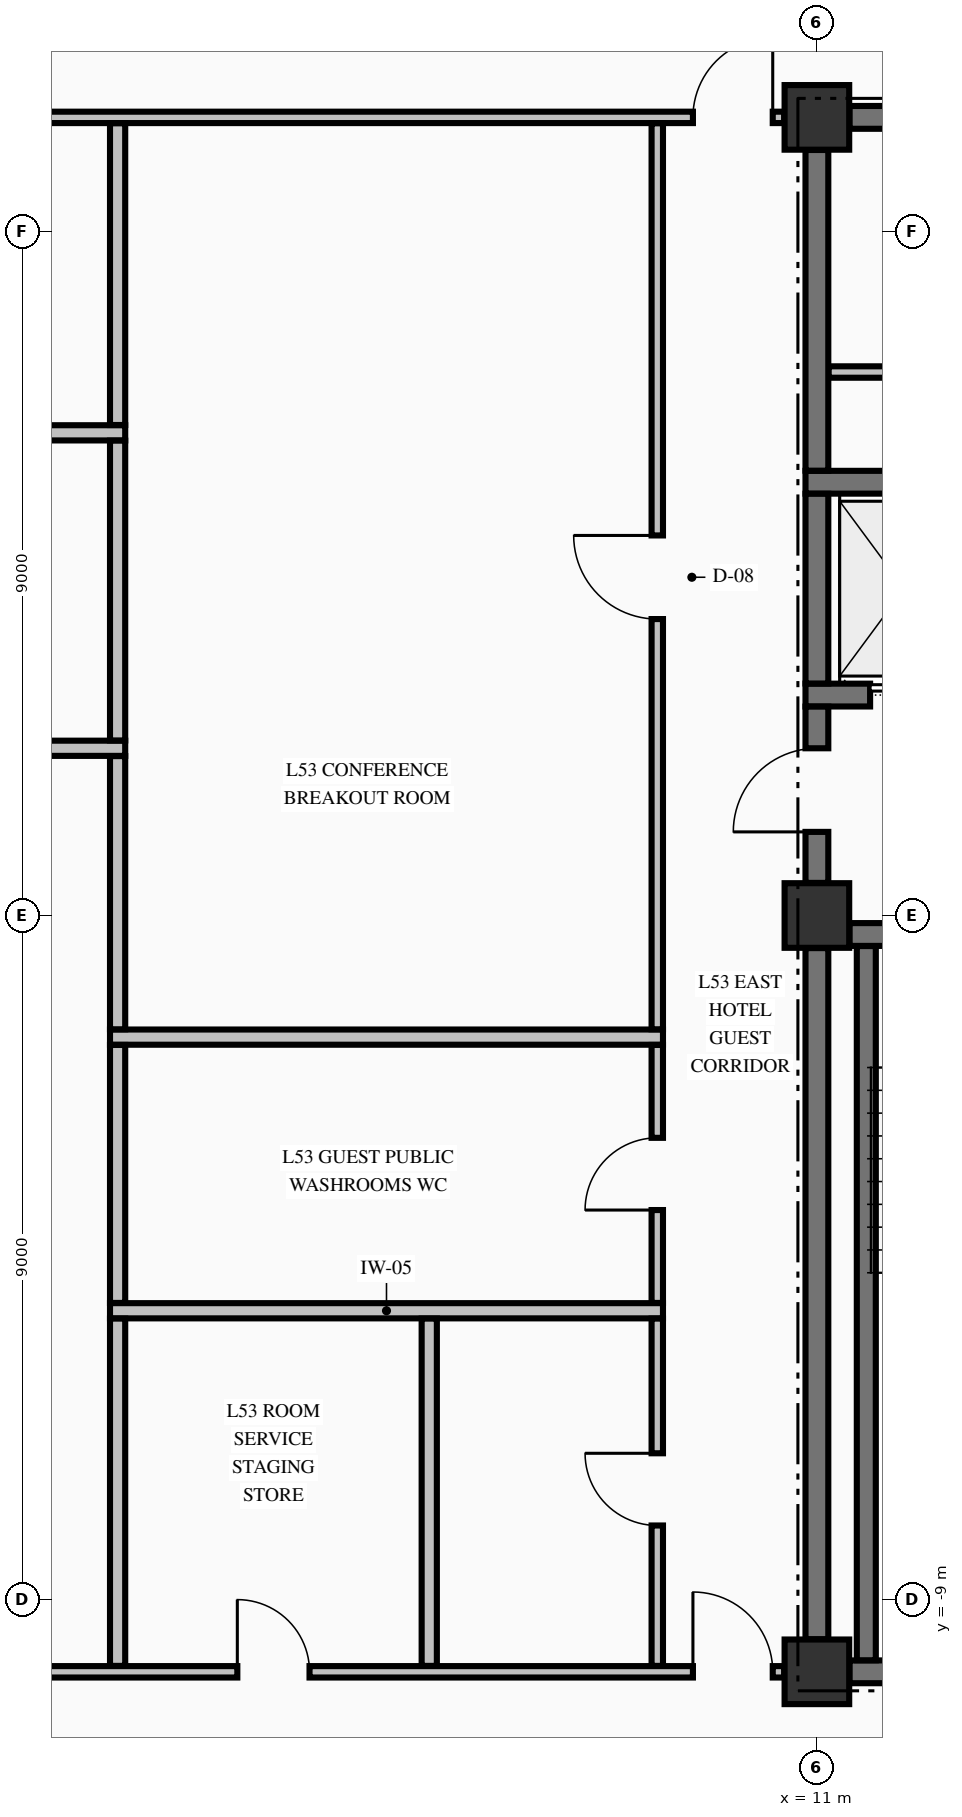
"""IFC4 building model, lengths in metres.
Left out: names, types, materials, properties, quantities, classifications, styles, units other than length and angle.
Written with IfcOpenShell. Run it as: python <this file> out.ifc"""

import sys

from ifc_helpers import new_model, si_unit, direction, frame, frame_2d, origin, origin_2d, place, context, subcontext, project, spatial, rectangle, extrude, element, fill, save


model = new_model("IFC4")
c1 = context("Model", 3, precision=1e-05, world=origin(), true_north=direction((0.0, 1.0)))
c2 = subcontext(c1, "Body", "Model", "MODEL_VIEW")
j1 = project(units=[si_unit("LENGTHUNIT", "METRE"), si_unit("PLANEANGLEUNIT", "RADIAN")], contexts=[c1])
p1 = place(None, origin())
s1 = spatial("IfcSite", under=j1, at=p1, CompositionType="ELEMENT")
p2 = place(p1, origin())
s2 = spatial("IfcBuilding", under=s1, at=p2, CompositionType="ELEMENT")
p3 = place(p2, frame((0.0, 0.0, 205.06)))
s3 = spatial("IfcBuildingStorey", under=s2, at=p3, CompositionType="ELEMENT", Elevation=205.06)
for number, where, z_axis, x_axis in (
    (1, (11.0, -9.95, -0.25), (0.0, 0.0, 1.0), (1.0, 0.0, 0.0)),
    (2, (11.0, 0.0, -0.25), (0.0, 0.0, 1.0), (1.0, 0.0, 0.0)),
    (3, (11.0, 10.5, -0.25), (0.0, 0.0, 1.0), (1.0, 0.0, 0.0)),
):
    element("IfcColumn", number, at=place(p3, frame(where, z_axis=z_axis, x_axis=x_axis)), inside=s3, PredefinedType="COLUMN", context=c2, shape_type="SweptSolid", body=[
        extrude(rectangle(XDim=0.85, YDim=0.85, at=origin_2d()), origin(), (0.0, 0.0, 1.0), 3.4),
    ])
p4 = place(p3, frame((11.429, -9.95, 0.0), z_axis=(0.0, 0.0, 1.0), x_axis=(1.0, 0.0, 0.0)))
e4 = element("IfcWall", 4, at=p4, inside=s3, PredefinedType="SHEAR", context=c2, shape_type="SweptSolid", body=[
    extrude(rectangle(XDim=3.271, YDim=0.3, at=frame_2d((1.635, 0.0))), origin(), (0.0, 0.0, 1.0), 3.15),
])
p5 = place(p3, frame((11.429, -0.25, 0.0), z_axis=(0.0, 0.0, 1.0), x_axis=(1.0, 0.0, 0.0)))
e5 = element("IfcWall", 5, at=p5, inside=s3, PredefinedType="SHEAR", context=c2, shape_type="SweptSolid", body=[
    extrude(rectangle(XDim=3.446, YDim=0.3, at=frame_2d((1.723, 0.0))), origin(), (0.0, 0.0, 1.0), 3.15),
])
p6 = place(p5, frame((1.171, 0.0, 0.0)))
e6 = element("IfcOpeningElement", 6, at=p6, cuts=e5, PredefinedType="OPENING", context=c2, shape_type="SweptSolid", body=[
    extrude(rectangle(XDim=1.1, YDim=2.15, at=frame_2d((0.55, 1.075))), frame((0.0, 0.16, 0.0), z_axis=(0.0, -1.0, 0.0), x_axis=(1.0, 0.0, 0.0)), (0.0, 0.0, 1.0), 0.32),
])
p7 = place(p3, frame((10.85, 2.9, 0.0), z_axis=(0.0, 0.0, 1.0), x_axis=(1.0, 0.0, 0.0)))
e7 = element("IfcWall", 7, at=p7, inside=s3, PredefinedType="SHEAR", context=c2, shape_type="SweptSolid", body=[
    extrude(rectangle(XDim=4.025, YDim=0.3, at=frame_2d((2.012, 0.0))), origin(), (0.0, 0.0, 1.0), 3.15),
])
p8 = place(p7, frame((0.85, 0.0, 0.0)))
e8 = element("IfcOpeningElement", 8, at=p8, cuts=e7, PredefinedType="OPENING", context=c2, shape_type="SweptSolid", body=[
    extrude(rectangle(XDim=1.1, YDim=2.2, at=frame_2d((0.55, 1.1))), frame((0.0, 0.16, 0.0), z_axis=(0.0, -1.0, 0.0), x_axis=(1.0, 0.0, 0.0)), (0.0, 0.0, 1.0), 0.32),
])
p9 = place(p3, frame((10.85, 5.7, 0.0), z_axis=(0.0, 0.0, 1.0), x_axis=(1.0, 0.0, 0.0)))
e9 = element("IfcWall", 9, at=p9, inside=s3, PredefinedType="SHEAR", context=c2, shape_type="SweptSolid", body=[
    extrude(rectangle(XDim=4.025, YDim=0.3, at=frame_2d((2.012, 0.0))), origin(), (0.0, 0.0, 1.0), 3.15),
])
p10 = place(p3, frame((11.429, 10.5, 0.0), z_axis=(0.0, 0.0, 1.0), x_axis=(1.0, 0.0, 0.0)))
e10 = element("IfcWall", 10, at=p10, inside=s3, PredefinedType="SHEAR", context=c2, shape_type="SweptSolid", body=[
    extrude(rectangle(XDim=3.271, YDim=0.3, at=frame_2d((1.635, 0.0))), origin(), (0.0, 0.0, 1.0), 3.15),
])
p11 = place(p10, frame((2.016, 0.0, 0.0)))
e11 = element("IfcOpeningElement", 11, at=p11, cuts=e10, PredefinedType="OPENING", context=c2, shape_type="SweptSolid", body=[
    extrude(rectangle(XDim=0.95, YDim=2.15, at=frame_2d((0.475, 1.075))), frame((0.0, 0.16, 0.0), z_axis=(0.0, -1.0, 0.0), x_axis=(1.0, 0.0, 0.0)), (0.0, 0.0, 1.0), 0.32),
])
p12 = place(p3, frame((-10.569, -9.95, 0.0), z_axis=(0.0, 0.0, 1.0), x_axis=(1.0, 0.0, 0.0)))
e12 = element("IfcWall", 12, at=p12, inside=s3, PredefinedType="PARTITIONING", context=c2, shape_type="SweptSolid", body=[
    extrude(rectangle(XDim=21.138, YDim=0.15, at=frame_2d((10.569, 0.0))), origin(), (0.0, 0.0, 1.0), 3.15),
])
p13 = place(p12, frame((0.15, 0.0, 0.0)))
e13 = element("IfcOpeningElement", 13, at=p13, cuts=e12, PredefinedType="OPENING", context=c2, shape_type="SweptSolid", body=[
    extrude(rectangle(XDim=1.05, YDim=2.15, at=frame_2d((0.525, 1.075))), frame((0.0, 0.085, 0.0), z_axis=(0.0, -1.0, 0.0), x_axis=(1.0, 0.0, 0.0)), (0.0, 0.0, 1.0), 0.17),
])
p14 = place(p12, frame((19.938, 0.0, 0.0)))
e14 = element("IfcOpeningElement", 14, at=p14, cuts=e12, PredefinedType="OPENING", context=c2, shape_type="SweptSolid", body=[
    extrude(rectangle(XDim=1.05, YDim=2.15, at=frame_2d((0.525, 1.075))), frame((0.0, 0.085, 0.0), z_axis=(0.0, -1.0, 0.0), x_axis=(1.0, 0.0, 0.0)), (0.0, 0.0, 1.0), 0.17),
])
p15 = place(p12, frame((13.944, 0.0, 0.0)))
e15 = element("IfcOpeningElement", 15, at=p15, cuts=e12, PredefinedType="OPENING", context=c2, shape_type="SweptSolid", body=[
    extrude(rectangle(XDim=0.95, YDim=2.15, at=frame_2d((0.475, 1.075))), frame((0.0, 0.085, 0.0), z_axis=(0.0, -1.0, 0.0), x_axis=(1.0, 0.0, 0.0)), (0.0, 0.0, 1.0), 0.17),
])
for number, where, z_axis, x_axis in (
    (16, (1.7, -5.2, 0.0), (0.0, 0.0, 1.0), (1.0, 0.0, 0.0)),
    (17, (1.7, -1.6, 0.0), (0.0, 0.0, 1.0), (1.0, 0.0, 0.0)),
):
    element("IfcWall", number, at=place(p3, frame(where, z_axis=z_axis, x_axis=x_axis)), inside=s3, PredefinedType="PARTITIONING", context=c2, shape_type="SweptSolid", body=[
        extrude(rectangle(XDim=7.275, YDim=0.2, at=frame_2d((3.638, 0.0))), origin(), (0.0, 0.0, 1.0), 3.15),
    ])
for number, where, z_axis, x_axis in (
    (18, (-8.975, 2.2, 0.0), (0.0, 0.0, 1.0), (1.0, 0.0, 0.0)),
    (19, (-8.975, 6.35, 0.0), (0.0, 0.0, 1.0), (1.0, 0.0, 0.0)),
):
    element("IfcWall", number, at=place(p3, frame(where, z_axis=z_axis, x_axis=x_axis)), inside=s3, PredefinedType="PARTITIONING", context=c2, shape_type="SweptSolid", body=[
        extrude(rectangle(XDim=10.875, YDim=0.2, at=frame_2d((5.438, 0.0))), origin(), (0.0, 0.0, 1.0), 3.15),
    ])
p16 = place(p3, frame((11.153, 7.15, 0.0), z_axis=(0.0, 0.0, 1.0), x_axis=(1.0, 0.0, 0.0)))
e20 = element("IfcWall", 20, at=p16, inside=s3, PredefinedType="PARTITIONING", context=c2, shape_type="SweptSolid", body=[
    extrude(rectangle(XDim=2.072, YDim=0.15, at=frame_2d((1.036, 0.0))), origin(), (0.0, 0.0, 1.0), 3.15),
])
p17 = place(p3, frame((-10.569, 10.5, 0.0), z_axis=(0.0, 0.0, 1.0), x_axis=(1.0, 0.0, 0.0)))
e21 = element("IfcWall", 21, at=p17, inside=s3, PredefinedType="PARTITIONING", context=c2, shape_type="SweptSolid", body=[
    extrude(rectangle(XDim=21.138, YDim=0.15, at=frame_2d((10.569, 0.0))), origin(), (0.0, 0.0, 1.0), 3.15),
])
p18 = place(p17, frame((0.15, 0.0, 0.0)))
e22 = element("IfcOpeningElement", 22, at=p18, cuts=e21, PredefinedType="OPENING", context=c2, shape_type="SweptSolid", body=[
    extrude(rectangle(XDim=1.05, YDim=2.15, at=frame_2d((0.525, 1.075))), frame((0.0, 0.085, 0.0), z_axis=(0.0, -1.0, 0.0), x_axis=(1.0, 0.0, 0.0)), (0.0, 0.0, 1.0), 0.17),
])
p19 = place(p17, frame((19.938, 0.0, 0.0)))
e23 = element("IfcOpeningElement", 23, at=p19, cuts=e21, PredefinedType="OPENING", context=c2, shape_type="SweptSolid", body=[
    extrude(rectangle(XDim=1.05, YDim=2.15, at=frame_2d((0.525, 1.075))), frame((0.0, 0.085, 0.0), z_axis=(0.0, -1.0, 0.0), x_axis=(1.0, 0.0, 0.0)), (0.0, 0.0, 1.0), 0.17),
])
p20 = place(p3, frame((11.0, -9.521, 0.0), z_axis=(0.0, 0.0, 1.0), x_axis=(0.0, 1.0, 0.0)))
e24 = element("IfcWall", 24, at=p20, inside=s3, PredefinedType="SHEAR", context=c2, shape_type="SweptSolid", body=[
    extrude(rectangle(XDim=9.092, YDim=0.3, at=frame_2d((4.546, 0.0))), origin(), (0.0, 0.0, 1.0), 3.15),
])
p21 = place(p3, frame((11.0, 0.429, 0.0), z_axis=(0.0, 0.0, 1.0), x_axis=(0.0, 1.0, 0.0)))
e25 = element("IfcWall", 25, at=p21, inside=s3, PredefinedType="SHEAR", context=c2, shape_type="SweptSolid", body=[
    extrude(rectangle(XDim=2.319, YDim=0.3, at=frame_2d((1.16, 0.0))), origin(), (0.0, 0.0, 1.0), 3.15),
])
p22 = place(p21, frame((0.671, 0.0, 0.0)))
e26 = element("IfcOpeningElement", 26, at=p22, cuts=e25, PredefinedType="OPENING", context=c2, shape_type="SweptSolid", body=[
    extrude(rectangle(XDim=1.1, YDim=2.15, at=frame_2d((0.55, 1.075))), frame((0.0, 0.16, 0.0), z_axis=(0.0, -1.0, 0.0), x_axis=(1.0, 0.0, 0.0)), (0.0, 0.0, 1.0), 0.32),
])
p23 = place(p3, frame((11.0, 3.052, 0.0), z_axis=(0.0, 0.0, 1.0), x_axis=(0.0, 1.0, 0.0)))
e27 = element("IfcWall", 27, at=p23, inside=s3, PredefinedType="SHEAR", context=c2, shape_type="SweptSolid", body=[
    extrude(rectangle(XDim=2.496, YDim=0.3, at=frame_2d((1.248, 0.0))), origin(), (0.0, 0.0, 1.0), 3.15),
])
p24 = place(p3, frame((11.0, 5.852, 0.0), z_axis=(0.0, 0.0, 1.0), x_axis=(0.0, 1.0, 0.0)))
e28 = element("IfcWall", 28, at=p24, inside=s3, PredefinedType="SHEAR", context=c2, shape_type="SweptSolid", body=[
    extrude(rectangle(XDim=4.219, YDim=0.3, at=frame_2d((2.109, 0.0))), origin(), (0.0, 0.0, 1.0), 3.15),
])
p25 = place(p3, frame((11.65, -9.798, 0.0), z_axis=(0.0, 0.0, 1.0), x_axis=(0.0, 1.0, 0.0)))
e29 = element("IfcWall", 29, at=p25, inside=s3, PredefinedType="SOLIDWALL", context=c2, shape_type="SweptSolid", body=[
    extrude(rectangle(XDim=9.396, YDim=0.25, at=frame_2d((4.698, 0.0))), origin(), (0.0, 0.0, 1.0), 3.15),
])
p26 = place(p3, frame((1.8, -9.872, 0.0), z_axis=(0.0, 0.0, 1.0), x_axis=(0.0, 1.0, 0.0)))
e30 = element("IfcWall", 30, at=p26, inside=s3, PredefinedType="PARTITIONING", context=c2, shape_type="SweptSolid", body=[
    extrude(rectangle(XDim=4.569, YDim=0.2, at=frame_2d((2.285, 0.0))), origin(), (0.0, 0.0, 1.0), 3.15),
])
p27 = place(p3, frame((1.8, -5.097, 0.0), z_axis=(0.0, 0.0, 1.0), x_axis=(0.0, 1.0, 0.0)))
e31 = element("IfcWall", 31, at=p27, inside=s3, PredefinedType="PARTITIONING", context=c2, shape_type="SweptSolid", body=[
    extrude(rectangle(XDim=3.394, YDim=0.2, at=frame_2d((1.697, 0.0))), origin(), (0.0, 0.0, 1.0), 3.15),
])
p28 = place(p3, frame((1.8, -1.497, 0.0), z_axis=(0.0, 0.0, 1.0), x_axis=(0.0, 1.0, 0.0)))
e32 = element("IfcWall", 32, at=p28, inside=s3, PredefinedType="PARTITIONING", context=c2, shape_type="SweptSolid", body=[
    extrude(rectangle(XDim=3.594, YDim=0.2, at=frame_2d((1.797, 0.0))), origin(), (0.0, 0.0, 1.0), 3.15),
])
p29 = place(p3, frame((1.8, 2.303, 0.0), z_axis=(0.0, 0.0, 1.0), x_axis=(0.0, 1.0, 0.0)))
e33 = element("IfcWall", 33, at=p29, inside=s3, PredefinedType="PARTITIONING", context=c2, shape_type="SweptSolid", body=[
    extrude(rectangle(XDim=3.944, YDim=0.2, at=frame_2d((1.972, 0.0))), origin(), (0.0, 0.0, 1.0), 3.15),
])
p30 = place(p3, frame((1.8, 6.453, 0.0), z_axis=(0.0, 0.0, 1.0), x_axis=(0.0, 1.0, 0.0)))
e34 = element("IfcWall", 34, at=p30, inside=s3, PredefinedType="PARTITIONING", context=c2, shape_type="SweptSolid", body=[
    extrude(rectangle(XDim=3.969, YDim=0.2, at=frame_2d((1.985, 0.0))), origin(), (0.0, 0.0, 1.0), 3.15),
])
p31 = place(p3, frame((5.9, -9.872, 0.0), z_axis=(0.0, 0.0, 1.0), x_axis=(0.0, 1.0, 0.0)))
e35 = element("IfcWall", 35, at=p31, inside=s3, PredefinedType="PARTITIONING", context=c2, shape_type="SweptSolid", body=[
    extrude(rectangle(XDim=4.569, YDim=0.2, at=frame_2d((2.285, 0.0))), origin(), (0.0, 0.0, 1.0), 3.15),
])
p32 = place(p3, frame((8.9, -9.872, 0.0), z_axis=(0.0, 0.0, 1.0), x_axis=(0.0, 1.0, 0.0)))
e36 = element("IfcWall", 36, at=p32, inside=s3, PredefinedType="PARTITIONING", context=c2, shape_type="SweptSolid", body=[
    extrude(rectangle(XDim=4.569, YDim=0.15, at=frame_2d((2.285, 0.0))), origin(), (0.0, 0.0, 1.0), 3.15),
])
p33 = place(p32, frame((1.847, 0.0, 0.0)))
e37 = element("IfcOpeningElement", 37, at=p33, cuts=e36, PredefinedType="OPENING", context=c2, shape_type="SweptSolid", body=[
    extrude(rectangle(XDim=0.95, YDim=2.15, at=frame_2d((0.475, 1.075))), frame((0.0, 0.085, 0.0), z_axis=(0.0, -1.0, 0.0), x_axis=(1.0, 0.0, 0.0)), (0.0, 0.0, 1.0), 0.17),
])
p34 = place(p3, frame((8.9, -5.097, 0.0), z_axis=(0.0, 0.0, 1.0), x_axis=(0.0, 1.0, 0.0)))
e38 = element("IfcWall", 38, at=p34, inside=s3, PredefinedType="PARTITIONING", context=c2, shape_type="SweptSolid", body=[
    extrude(rectangle(XDim=3.394, YDim=0.15, at=frame_2d((1.697, 0.0))), origin(), (0.0, 0.0, 1.0), 3.15),
])
p35 = place(p34, frame((1.222, 0.0, 0.0)))
e39 = element("IfcOpeningElement", 39, at=p35, cuts=e38, PredefinedType="OPENING", context=c2, shape_type="SweptSolid", body=[
    extrude(rectangle(XDim=0.95, YDim=2.15, at=frame_2d((0.475, 1.075))), frame((0.0, 0.085, 0.0), z_axis=(0.0, -1.0, 0.0), x_axis=(1.0, 0.0, 0.0)), (0.0, 0.0, 1.0), 0.17),
])
p36 = place(p3, frame((8.9, -1.497, 0.0), z_axis=(0.0, 0.0, 1.0), x_axis=(0.0, 1.0, 0.0)))
e40 = element("IfcWall", 40, at=p36, inside=s3, PredefinedType="PARTITIONING", context=c2, shape_type="SweptSolid", body=[
    extrude(rectangle(XDim=11.919, YDim=0.15, at=frame_2d((5.959, 0.0))), origin(), (0.0, 0.0, 1.0), 3.15),
])
p37 = place(p36, frame((5.397, 0.0, 0.0)))
e41 = element("IfcOpeningElement", 41, at=p37, cuts=e40, PredefinedType="OPENING", context=c2, shape_type="SweptSolid", body=[
    extrude(rectangle(XDim=1.1, YDim=2.15, at=frame_2d((0.55, 1.075))), frame((0.0, 0.085, 0.0), z_axis=(0.0, -1.0, 0.0), x_axis=(1.0, 0.0, 0.0)), (0.0, 0.0, 1.0), 0.17),
])
p38 = place(p22, origin())
e42 = element("IfcDoor", 42, at=p38, inside=s3, OperationType="SINGLE_SWING_LEFT", PredefinedType="DOOR", context=c2, shape_type="SweptSolid", body=[
    extrude(rectangle(XDim=1.1, YDim=2.15, at=frame_2d((0.55, 1.075))), frame((0.0, 0.025, 0.0), z_axis=(0.0, -1.0, 0.0), x_axis=(1.0, 0.0, 0.0)), (0.0, 0.0, 1.0), 0.05),
])
fill(e26, e42)
p39 = place(p8, origin())
e43 = element("IfcDoor", 43, at=p39, inside=s3, OperationType="SLIDING_TO_RIGHT", PredefinedType="DOOR", context=c2, shape_type="SweptSolid", body=[
    extrude(rectangle(XDim=1.1, YDim=2.2, at=frame_2d((0.55, 1.1))), frame((0.0, 0.025, 0.0), z_axis=(0.0, -1.0, 0.0), x_axis=(1.0, 0.0, 0.0)), (0.0, 0.0, 1.0), 0.05),
])
fill(e8, e43)
p40 = place(p19, origin())
e44 = element("IfcDoor", 44, at=p40, inside=s3, OperationType="SINGLE_SWING_RIGHT", PredefinedType="DOOR", context=c2, shape_type="SweptSolid", body=[
    extrude(rectangle(XDim=1.05, YDim=2.15, at=frame_2d((0.525, 1.075))), frame((0.0, 0.025, 0.0), z_axis=(0.0, -1.0, 0.0), x_axis=(1.0, 0.0, 0.0)), (0.0, 0.0, 1.0), 0.05),
])
fill(e23, e44)
p41 = place(p14, origin())
e45 = element("IfcDoor", 45, at=p41, inside=s3, OperationType="SINGLE_SWING_LEFT", PredefinedType="DOOR", context=c2, shape_type="SweptSolid", body=[
    extrude(rectangle(XDim=1.05, YDim=2.15, at=frame_2d((0.525, 1.075))), frame((0.0, 0.025, 0.0), z_axis=(0.0, -1.0, 0.0), x_axis=(1.0, 0.0, 0.0)), (0.0, 0.0, 1.0), 0.05),
])
fill(e14, e45)
p42 = place(p37, origin())
e46 = element("IfcDoor", 46, at=p42, inside=s3, OperationType="SINGLE_SWING_RIGHT", PredefinedType="DOOR", context=c2, shape_type="SweptSolid", body=[
    extrude(rectangle(XDim=1.1, YDim=2.15, at=frame_2d((0.55, 1.075))), frame((0.0, 0.025, 0.0), z_axis=(0.0, -1.0, 0.0), x_axis=(1.0, 0.0, 0.0)), (0.0, 0.0, 1.0), 0.05),
])
fill(e41, e46)
p43 = place(p35, origin())
e47 = element("IfcDoor", 47, at=p43, inside=s3, OperationType="SINGLE_SWING_LEFT", PredefinedType="DOOR", context=c2, shape_type="SweptSolid", body=[
    extrude(rectangle(XDim=0.95, YDim=2.15, at=frame_2d((0.475, 1.075))), frame((0.0, 0.025, 0.0), z_axis=(0.0, -1.0, 0.0), x_axis=(1.0, 0.0, 0.0)), (0.0, 0.0, 1.0), 0.05),
])
fill(e39, e47)
p44 = place(p33, origin())
e48 = element("IfcDoor", 48, at=p44, inside=s3, OperationType="SINGLE_SWING_RIGHT", PredefinedType="DOOR", context=c2, shape_type="SweptSolid", body=[
    extrude(rectangle(XDim=0.95, YDim=2.15, at=frame_2d((0.475, 1.075))), frame((0.0, 0.025, 0.0), z_axis=(0.0, -1.0, 0.0), x_axis=(1.0, 0.0, 0.0)), (0.0, 0.0, 1.0), 0.05),
])
fill(e37, e48)
p45 = place(p15, origin())
e49 = element("IfcDoor", 49, at=p45, inside=s3, OperationType="SINGLE_SWING_LEFT", PredefinedType="DOOR", context=c2, shape_type="SweptSolid", body=[
    extrude(rectangle(XDim=0.95, YDim=2.15, at=frame_2d((0.475, 1.075))), frame((0.0, 0.025, 0.0), z_axis=(0.0, -1.0, 0.0), x_axis=(1.0, 0.0, 0.0)), (0.0, 0.0, 1.0), 0.05),
])
fill(e15, e49)
save(model, sys.argv[1])
